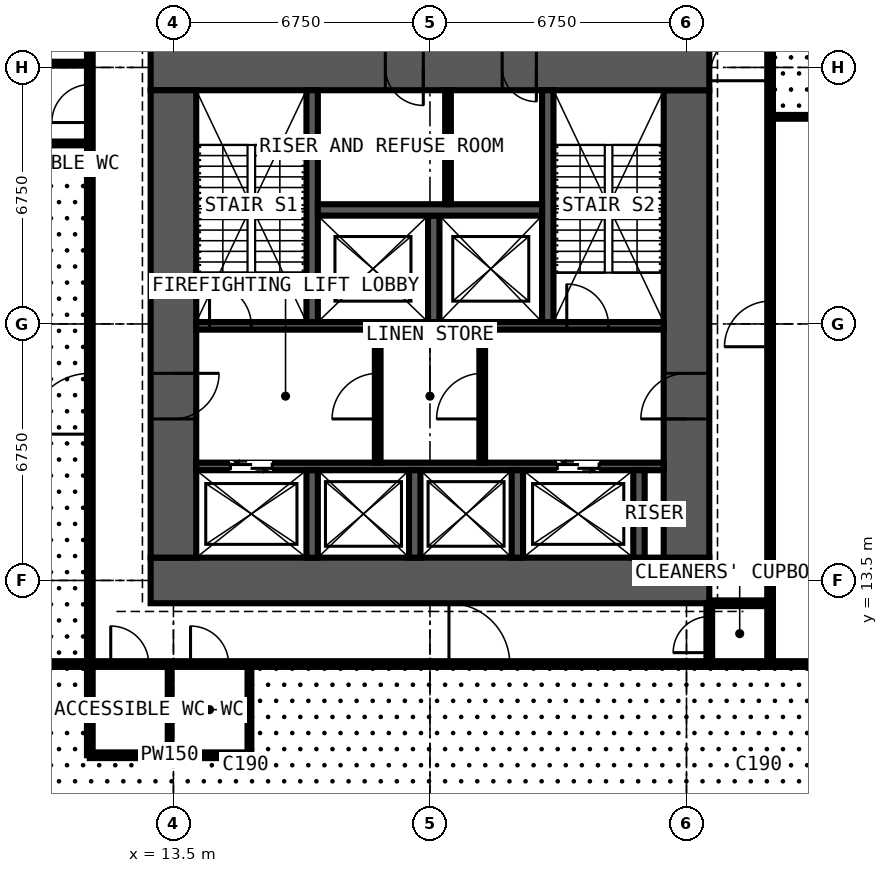
"""IFC4 building model, lengths in metres.
Left out: names, types, materials, properties, quantities, classifications, styles, units other than length and angle.
Written with IfcOpenShell. Run it as: python <this file> out.ifc"""

import sys

from ifc_helpers import new_model, si_unit, direction, frame, frame_2d, origin, place, context, subcontext, project, spatial, rectangle, extrude, element, fill, save


model = new_model("IFC4")
c1 = context("Model", 3, precision=1e-05, world=origin(), true_north=direction((0.0, 1.0)))
c2 = subcontext(c1, "Body", "Model", "MODEL_VIEW")
j1 = project(units=[si_unit("LENGTHUNIT", "METRE"), si_unit("PLANEANGLEUNIT", "RADIAN")], contexts=[c1])
p1 = place(None, origin())
s1 = spatial("IfcSite", under=j1, at=p1, CompositionType="ELEMENT")
p2 = place(p1, origin())
s2 = spatial("IfcBuilding", under=s1, at=p2, CompositionType="ELEMENT")
p3 = place(p2, frame((0.0, 0.0, 13.5)))
s3 = spatial("IfcBuildingStorey", under=s2, at=p3, CompositionType="ELEMENT", Elevation=13.5)
p4 = place(p3, frame((12.9, 13.5, 0.0), z_axis=(0.0, 0.0, 1.0), x_axis=(1.0, 0.0, 0.0)))
e1 = element("IfcWall", 1, at=p4, inside=s3, PredefinedType="SHEAR", context=c2, shape_type="SweptSolid", body=[
    extrude(rectangle(XDim=14.7, YDim=1.2, at=frame_2d((7.35, 0.0))), origin(), (0.0, 0.0, 1.0), 4.5),
])
p5 = place(p3, frame((27.0, 14.1, 0.0), z_axis=(0.0, 0.0, 1.0), x_axis=(0.0, 1.0, 0.0)))
e2 = element("IfcWall", 2, at=p5, inside=s3, PredefinedType="SHEAR", context=c2, shape_type="SweptSolid", body=[
    extrude(rectangle(XDim=12.3, YDim=1.2, at=frame_2d((6.15, 0.0))), origin(), (0.0, 0.0, 1.0), 4.5),
])
p6 = place(p5, frame((3.65, 0.0, 0.0)))
e3 = element("IfcOpeningElement", 3, at=p6, cuts=e2, PredefinedType="OPENING", context=c2, shape_type="SweptSolid", body=[
    extrude(rectangle(XDim=1.2, YDim=2.2, at=frame_2d((0.6, 1.1))), frame((0.0, 0.61, 0.0), z_axis=(0.0, -1.0, 0.0), x_axis=(1.0, 0.0, 0.0)), (0.0, 0.0, 1.0), 1.22),
])
p7 = place(p3, frame((27.6, 27.0, 0.0), z_axis=(0.0, 0.0, 1.0), x_axis=(-1.0, 0.0, 0.0)))
e4 = element("IfcWall", 4, at=p7, inside=s3, PredefinedType="SHEAR", context=c2, shape_type="SweptSolid", body=[
    extrude(rectangle(XDim=14.7, YDim=1.2, at=frame_2d((7.35, 0.0))), origin(), (0.0, 0.0, 1.0), 4.5),
])
p8 = place(p7, frame((4.55, 0.0, 0.0)))
e5 = element("IfcOpeningElement", 5, at=p8, cuts=e4, PredefinedType="OPENING", context=c2, shape_type="SweptSolid", body=[
    extrude(rectangle(XDim=0.9, YDim=2.2, at=frame_2d((0.45, 1.1))), frame((0.0, 0.61, 0.0), z_axis=(0.0, -1.0, 0.0), x_axis=(1.0, 0.0, 0.0)), (0.0, 0.0, 1.0), 1.22),
])
p9 = place(p7, frame((7.525, 0.0, 0.0)))
e6 = element("IfcOpeningElement", 6, at=p9, cuts=e4, PredefinedType="OPENING", context=c2, shape_type="SweptSolid", body=[
    extrude(rectangle(XDim=1.0, YDim=2.2, at=frame_2d((0.5, 1.1))), frame((0.0, 0.61, 0.0), z_axis=(0.0, -1.0, 0.0), x_axis=(1.0, 0.0, 0.0)), (0.0, 0.0, 1.0), 1.22),
])
p10 = place(p3, frame((13.5, 26.4, 0.0), z_axis=(0.0, 0.0, 1.0), x_axis=(0.0, -1.0, 0.0)))
e7 = element("IfcWall", 7, at=p10, inside=s3, PredefinedType="SHEAR", context=c2, shape_type="SweptSolid", body=[
    extrude(rectangle(XDim=12.3, YDim=1.2, at=frame_2d((6.15, 0.0))), origin(), (0.0, 0.0, 1.0), 4.5),
])
p11 = place(p10, frame((7.45, 0.0, 0.0)))
e8 = element("IfcOpeningElement", 8, at=p11, cuts=e7, PredefinedType="OPENING", context=c2, shape_type="SweptSolid", body=[
    extrude(rectangle(XDim=1.2, YDim=2.2, at=frame_2d((0.6, 1.1))), frame((0.0, 0.61, 0.0), z_axis=(0.0, -1.0, 0.0), x_axis=(1.0, 0.0, 0.0)), (0.0, 0.0, 1.0), 1.22),
])
p12 = place(p3, frame((14.1, 16.5, 0.0), z_axis=(0.0, 0.0, 1.0), x_axis=(1.0, 0.0, 0.0)))
e9 = element("IfcWall", 9, at=p12, inside=s3, PredefinedType="SHEAR", context=c2, shape_type="SweptSolid", body=[
    extrude(rectangle(XDim=12.3, YDim=0.2, at=frame_2d((6.15, 0.0))), origin(), (0.0, 0.0, 1.0), 4.5),
])
p13 = place(p12, frame((0.9, 0.0, 0.0)))
e10 = element("IfcOpeningElement", 10, at=p13, cuts=e9, PredefinedType="OPENING", context=c2, shape_type="SweptSolid", body=[
    extrude(rectangle(XDim=1.1, YDim=2.2, at=frame_2d((0.55, 1.1))), frame((0.0, 0.11, 0.0), z_axis=(0.0, -1.0, 0.0), x_axis=(1.0, 0.0, 0.0)), (0.0, 0.0, 1.0), 0.22),
])
p14 = place(p12, frame((9.5, 0.0, 0.0)))
e11 = element("IfcOpeningElement", 11, at=p14, cuts=e9, PredefinedType="OPENING", context=c2, shape_type="SweptSolid", body=[
    extrude(rectangle(XDim=1.1, YDim=2.2, at=frame_2d((0.55, 1.1))), frame((0.0, 0.11, 0.0), z_axis=(0.0, -1.0, 0.0), x_axis=(1.0, 0.0, 0.0)), (0.0, 0.0, 1.0), 0.22),
])
p15 = place(p3, frame((14.1, 20.2, 0.0), z_axis=(0.0, 0.0, 1.0), x_axis=(1.0, 0.0, 0.0)))
e12 = element("IfcWall", 12, at=p15, inside=s3, PredefinedType="SHEAR", context=c2, shape_type="SweptSolid", body=[
    extrude(rectangle(XDim=12.3, YDim=0.2, at=frame_2d((6.15, 0.0))), origin(), (0.0, 0.0, 1.0), 4.5),
])
p16 = place(p15, frame((0.35, 0.0, 0.0)))
e13 = element("IfcOpeningElement", 13, at=p16, cuts=e12, PredefinedType="OPENING", context=c2, shape_type="SweptSolid", body=[
    extrude(rectangle(XDim=1.1, YDim=2.2, at=frame_2d((0.55, 1.1))), frame((0.0, 0.11, 0.0), z_axis=(0.0, -1.0, 0.0), x_axis=(1.0, 0.0, 0.0)), (0.0, 0.0, 1.0), 0.22),
])
p17 = place(p15, frame((9.75, 0.0, 0.0)))
e14 = element("IfcOpeningElement", 14, at=p17, cuts=e12, PredefinedType="OPENING", context=c2, shape_type="SweptSolid", body=[
    extrude(rectangle(XDim=1.1, YDim=2.2, at=frame_2d((0.55, 1.1))), frame((0.0, 0.11, 0.0), z_axis=(0.0, -1.0, 0.0), x_axis=(1.0, 0.0, 0.0)), (0.0, 0.0, 1.0), 0.22),
])
for number, where, z_axis, x_axis in (
    (15, (17.15, 20.3, 0.0), (0.0, 0.0, 1.0), (0.0, 1.0, 0.0)),
    (16, (23.35, 20.3, 0.0), (0.0, 0.0, 1.0), (0.0, 1.0, 0.0)),
):
    element("IfcWall", number, at=place(p3, frame(where, z_axis=z_axis, x_axis=x_axis)), inside=s3, PredefinedType="SHEAR", context=c2, shape_type="SweptSolid", body=[
        extrude(rectangle(XDim=6.1, YDim=0.3, at=frame_2d((3.05, 0.0))), origin(), (0.0, 0.0, 1.0), 4.5),
    ])
p18 = place(p3, frame((20.35, 20.3, 0.0), z_axis=(0.0, 0.0, 1.0), x_axis=(0.0, 1.0, 0.0)))
e17 = element("IfcWall", 17, at=p18, inside=s3, PredefinedType="SHEAR", context=c2, shape_type="SweptSolid", body=[
    extrude(rectangle(XDim=2.8, YDim=0.3, at=frame_2d((1.4, 0.0))), origin(), (0.0, 0.0, 1.0), 4.5),
])
p19 = place(p3, frame((17.3, 23.25, 0.0), z_axis=(0.0, 0.0, 1.0), x_axis=(1.0, 0.0, 0.0)))
e18 = element("IfcWall", 18, at=p19, inside=s3, PredefinedType="SHEAR", context=c2, shape_type="SweptSolid", body=[
    extrude(rectangle(XDim=5.9, YDim=0.3, at=frame_2d((2.95, 0.0))), origin(), (0.0, 0.0, 1.0), 4.5),
])
for number, where, z_axis, x_axis in (
    (19, (17.15, 14.1, 0.0), (0.0, 0.0, 1.0), (0.0, 1.0, 0.0)),
    (20, (19.85, 14.1, 0.0), (0.0, 0.0, 1.0), (0.0, 1.0, 0.0)),
    (21, (22.55, 14.1, 0.0), (0.0, 0.0, 1.0), (0.0, 1.0, 0.0)),
    (22, (25.75, 14.1, 0.0), (0.0, 0.0, 1.0), (0.0, 1.0, 0.0)),
):
    element("IfcWall", number, at=place(p3, frame(where, z_axis=z_axis, x_axis=x_axis)), inside=s3, PredefinedType="SHEAR", context=c2, shape_type="SweptSolid", body=[
        extrude(rectangle(XDim=2.3, YDim=0.3, at=frame_2d((1.15, 0.0))), origin(), (0.0, 0.0, 1.0), 4.5),
    ])
p20 = place(p3, frame((18.875, 16.6, 0.0), z_axis=(0.0, 0.0, 1.0), x_axis=(0.0, 1.0, 0.0)))
e23 = element("IfcWall", 23, at=p20, inside=s3, PredefinedType="PARTITIONING", context=c2, shape_type="SweptSolid", body=[
    extrude(rectangle(XDim=3.5, YDim=0.15, at=frame_2d((1.75, 0.0))), origin(), (0.0, 0.0, 1.0), 4.275),
])
p21 = place(p20, frame((1.15, 0.0, 0.0)))
e24 = element("IfcOpeningElement", 24, at=p21, cuts=e23, PredefinedType="OPENING", context=c2, shape_type="SweptSolid", body=[
    extrude(rectangle(XDim=1.2, YDim=2.2, at=frame_2d((0.6, 1.1))), frame((0.0, 0.085, 0.0), z_axis=(0.0, -1.0, 0.0), x_axis=(1.0, 0.0, 0.0)), (0.0, 0.0, 1.0), 0.17),
])
p22 = place(p3, frame((21.625, 16.6, 0.0), z_axis=(0.0, 0.0, 1.0), x_axis=(0.0, 1.0, 0.0)))
e25 = element("IfcWall", 25, at=p22, inside=s3, PredefinedType="PARTITIONING", context=c2, shape_type="SweptSolid", body=[
    extrude(rectangle(XDim=3.5, YDim=0.15, at=frame_2d((1.75, 0.0))), origin(), (0.0, 0.0, 1.0), 4.275),
])
p23 = place(p22, frame((1.15, 0.0, 0.0)))
e26 = element("IfcOpeningElement", 26, at=p23, cuts=e25, PredefinedType="OPENING", context=c2, shape_type="SweptSolid", body=[
    extrude(rectangle(XDim=1.2, YDim=2.2, at=frame_2d((0.6, 1.1))), frame((0.0, 0.085, 0.0), z_axis=(0.0, -1.0, 0.0), x_axis=(1.0, 0.0, 0.0)), (0.0, 0.0, 1.0), 0.17),
])
p24 = place(p3, frame((20.725, 23.4, 0.0), z_axis=(0.0, 0.0, 1.0), x_axis=(0.0, 1.0, 0.0)))
e27 = element("IfcWall", 27, at=p24, inside=s3, PredefinedType="PARTITIONING", context=c2, shape_type="SweptSolid", body=[
    extrude(rectangle(XDim=3.0, YDim=0.15, at=frame_2d((1.5, 0.0))), origin(), (0.0, 0.0, 1.0), 4.275),
])
p25 = place(p3, frame((8.9, 25.0, 0.0), z_axis=(0.0, 0.0, 1.0), x_axis=(1.0, 0.0, 0.0)))
e28 = element("IfcWall", 28, at=p25, inside=s3, PredefinedType="PARTITIONING", context=c2, shape_type="SweptSolid", body=[
    extrude(rectangle(XDim=2.4, YDim=0.1, at=frame_2d((1.2, 0.0))), origin(), (0.0, 0.0, 1.0), 4.275),
])
p26 = place(p3, frame((8.9, 27.1, 0.0), z_axis=(0.0, 0.0, 1.0), x_axis=(1.0, 0.0, 0.0)))
e29 = element("IfcWall", 29, at=p26, inside=s3, PredefinedType="PARTITIONING", context=c2, shape_type="SweptSolid", body=[
    extrude(rectangle(XDim=2.4, YDim=0.1, at=frame_2d((1.2, 0.0))), origin(), (0.0, 0.0, 1.0), 3.777),
])
p27 = place(p3, frame((10.125, 11.3, 0.0), z_axis=(0.0, 0.0, 1.0), x_axis=(1.0, 0.0, 0.0)))
e30 = element("IfcWall", 30, at=p27, inside=s3, PredefinedType="PARTITIONING", context=c2, shape_type="SweptSolid", body=[
    extrude(rectangle(XDim=20.675, YDim=0.15, at=frame_2d((10.337, 0.0))), origin(), (0.0, 0.0, 1.0), 4.275),
])
p28 = place(p27, frame((1.725, 0.0, 0.0)))
e31 = element("IfcOpeningElement", 31, at=p28, cuts=e30, PredefinedType="OPENING", context=c2, shape_type="SweptSolid", body=[
    extrude(rectangle(XDim=1.0, YDim=2.2, at=frame_2d((0.5, 1.1))), frame((0.0, 0.085, 0.0), z_axis=(0.0, -1.0, 0.0), x_axis=(1.0, 0.0, 0.0)), (0.0, 0.0, 1.0), 0.17),
])
p29 = place(p27, frame((3.825, 0.0, 0.0)))
e32 = element("IfcOpeningElement", 32, at=p29, cuts=e30, PredefinedType="OPENING", context=c2, shape_type="SweptSolid", body=[
    extrude(rectangle(XDim=1.0, YDim=2.2, at=frame_2d((0.5, 1.1))), frame((0.0, 0.085, 0.0), z_axis=(0.0, -1.0, 0.0), x_axis=(1.0, 0.0, 0.0)), (0.0, 0.0, 1.0), 0.17),
])
p30 = place(p27, frame((10.625, 0.0, 0.0)))
e33 = element("IfcOpeningElement", 33, at=p30, cuts=e30, PredefinedType="OPENING", context=c2, shape_type="SweptSolid", body=[
    extrude(rectangle(XDim=1.6, YDim=2.4, at=frame_2d((0.8, 1.2))), frame((0.0, 0.085, 0.0), z_axis=(0.0, -1.0, 0.0), x_axis=(1.0, 0.0, 0.0)), (0.0, 0.0, 1.0), 0.17),
])
p31 = place(p3, frame((11.3, 8.9, 0.0), z_axis=(0.0, 0.0, 1.0), x_axis=(0.0, 1.0, 0.0)))
e34 = element("IfcWall", 34, at=p31, inside=s3, PredefinedType="PARTITIONING", context=c2, shape_type="SweptSolid", body=[
    extrude(rectangle(XDim=21.475, YDim=0.15, at=frame_2d((10.738, 0.0))), origin(), (0.0, 0.0, 1.0), 4.275),
])
p32 = place(p31, frame((16.65, 0.0, 0.0)))
e35 = element("IfcOpeningElement", 35, at=p32, cuts=e34, PredefinedType="OPENING", context=c2, shape_type="SweptSolid", body=[
    extrude(rectangle(XDim=1.0, YDim=2.2, at=frame_2d((0.5, 1.1))), frame((0.0, 0.085, 0.0), z_axis=(0.0, -1.0, 0.0), x_axis=(1.0, 0.0, 0.0)), (0.0, 0.0, 1.0), 0.17),
])
p33 = place(p31, frame((18.75, 0.0, 0.0)))
e36 = element("IfcOpeningElement", 36, at=p33, cuts=e34, PredefinedType="OPENING", context=c2, shape_type="SweptSolid", body=[
    extrude(rectangle(XDim=1.0, YDim=2.2, at=frame_2d((0.5, 1.1))), frame((0.0, 0.085, 0.0), z_axis=(0.0, -1.0, 0.0), x_axis=(1.0, 0.0, 0.0)), (0.0, 0.0, 1.0), 0.17),
])
p34 = place(p31, frame((8.45, 0.0, 0.0)))
e37 = element("IfcOpeningElement", 37, at=p34, cuts=e34, PredefinedType="OPENING", context=c2, shape_type="SweptSolid", body=[
    extrude(rectangle(XDim=1.6, YDim=2.4, at=frame_2d((0.8, 1.2))), frame((0.0, 0.085, 0.0), z_axis=(0.0, -1.0, 0.0), x_axis=(1.0, 0.0, 0.0)), (0.0, 0.0, 1.0), 0.17),
])
p35 = place(p3, frame((11.3, 8.9, 0.0), z_axis=(0.0, 0.0, 1.0), x_axis=(1.0, 0.0, 0.0)))
e38 = element("IfcWall", 38, at=p35, inside=s3, PredefinedType="PARTITIONING", context=c2, shape_type="SweptSolid", body=[
    extrude(rectangle(XDim=4.2, YDim=0.15, at=frame_2d((2.1, 0.0))), origin(), (0.0, 0.0, 1.0), 4.275),
])
p36 = place(p3, frame((13.4, 8.9, 0.0), z_axis=(0.0, 0.0, 1.0), x_axis=(0.0, 1.0, 0.0)))
e39 = element("IfcWall", 39, at=p36, inside=s3, PredefinedType="PARTITIONING", context=c2, shape_type="SweptSolid", body=[
    extrude(rectangle(XDim=2.4, YDim=0.1, at=frame_2d((1.2, 0.0))), origin(), (0.0, 0.0, 1.0), 3.777),
])
p37 = place(p3, frame((15.5, 8.9, 0.0), z_axis=(0.0, 0.0, 1.0), x_axis=(0.0, 1.0, 0.0)))
e40 = element("IfcWall", 40, at=p37, inside=s3, PredefinedType="PARTITIONING", context=c2, shape_type="SweptSolid", body=[
    extrude(rectangle(XDim=2.4, YDim=0.1, at=frame_2d((1.2, 0.0))), origin(), (0.0, 0.0, 1.0), 4.275),
])
p38 = place(p3, frame((27.6, 11.3, 0.0), z_axis=(0.0, 0.0, 1.0), x_axis=(0.0, 1.0, 0.0)))
e41 = element("IfcWall", 41, at=p38, inside=s3, PredefinedType="PARTITIONING", context=c2, shape_type="SweptSolid", body=[
    extrude(rectangle(XDim=1.6, YDim=0.15, at=frame_2d((0.8, 0.0))), origin(), (0.0, 0.0, 1.0), 4.275),
])
p39 = place(p38, frame((0.3, 0.0, 0.0)))
e42 = element("IfcOpeningElement", 42, at=p39, cuts=e41, PredefinedType="OPENING", context=c2, shape_type="SweptSolid", body=[
    extrude(rectangle(XDim=0.95, YDim=2.2, at=frame_2d((0.475, 1.1))), frame((0.0, 0.085, 0.0), z_axis=(0.0, -1.0, 0.0), x_axis=(1.0, 0.0, 0.0)), (0.0, 0.0, 1.0), 0.17),
])
p40 = place(p3, frame((27.6, 12.9, 0.0), z_axis=(0.0, 0.0, 1.0), x_axis=(1.0, 0.0, 0.0)))
e43 = element("IfcWall", 43, at=p40, inside=s3, PredefinedType="PARTITIONING", context=c2, shape_type="SweptSolid", body=[
    extrude(rectangle(XDim=1.6, YDim=0.15, at=frame_2d((0.8, 0.0))), origin(), (0.0, 0.0, 1.0), 3.777),
])
p41 = place(p3, frame((29.2, 11.3, 0.0), z_axis=(0.0, 0.0, 1.0), x_axis=(0.0, 1.0, 0.0)))
e44 = element("IfcWall", 44, at=p41, inside=s3, PredefinedType="PARTITIONING", context=c2, shape_type="SweptSolid", body=[
    extrude(rectangle(XDim=20.3, YDim=0.15, at=frame_2d((10.15, 0.0))), origin(), (0.0, 0.0, 1.0), 4.275),
])
p42 = place(p41, frame((15.35, 0.0, 0.0)))
e45 = element("IfcOpeningElement", 45, at=p42, cuts=e44, PredefinedType="OPENING", context=c2, shape_type="SweptSolid", body=[
    extrude(rectangle(XDim=1.6, YDim=2.4, at=frame_2d((0.8, 1.2))), frame((0.0, 0.085, 0.0), z_axis=(0.0, -1.0, 0.0), x_axis=(1.0, 0.0, 0.0)), (0.0, 0.0, 1.0), 0.17),
])
p43 = place(p41, frame((8.35, 0.0, 0.0)))
e46 = element("IfcOpeningElement", 46, at=p43, cuts=e44, PredefinedType="OPENING", context=c2, shape_type="SweptSolid", body=[
    extrude(rectangle(XDim=1.2, YDim=2.2, at=frame_2d((0.6, 1.1))), frame((0.0, 0.085, 0.0), z_axis=(0.0, -1.0, 0.0), x_axis=(1.0, 0.0, 0.0)), (0.0, 0.0, 1.0), 0.17),
])
p44 = place(p3, frame((29.2, 25.7, 0.0), z_axis=(0.0, 0.0, 1.0), x_axis=(1.0, 0.0, 0.0)))
e47 = element("IfcWall", 47, at=p44, inside=s3, PredefinedType="SHEAR", context=c2, shape_type="SweptSolid", body=[
    extrude(rectangle(XDim=3.45, YDim=0.1, at=frame_2d((1.725, 0.0))), origin(), (0.0, 0.0, 1.0), 4.275),
])
p45 = place(p13, origin())
e48 = element("IfcDoor", 48, at=p45, inside=s3, OperationType="DOUBLE_DOOR_SLIDING", PredefinedType="DOOR", context=c2, shape_type="SweptSolid", body=[
    extrude(rectangle(XDim=1.1, YDim=2.2, at=frame_2d((0.55, 1.1))), frame((0.0, 0.025, 0.0), z_axis=(0.0, -1.0, 0.0), x_axis=(1.0, 0.0, 0.0)), (0.0, 0.0, 1.0), 0.05),
])
fill(e10, e48)
p46 = place(p14, origin())
e49 = element("IfcDoor", 49, at=p46, inside=s3, OperationType="DOUBLE_DOOR_SLIDING", PredefinedType="DOOR", context=c2, shape_type="SweptSolid", body=[
    extrude(rectangle(XDim=1.1, YDim=2.2, at=frame_2d((0.55, 1.1))), frame((0.0, 0.025, 0.0), z_axis=(0.0, -1.0, 0.0), x_axis=(1.0, 0.0, 0.0)), (0.0, 0.0, 1.0), 0.05),
])
fill(e11, e49)
p47 = place(p11, origin())
e50 = element("IfcDoor", 50, at=p47, inside=s3, OperationType="DOUBLE_DOOR_SINGLE_SWING", PredefinedType="DOOR", context=c2, shape_type="SweptSolid", body=[
    extrude(rectangle(XDim=1.2, YDim=2.2, at=frame_2d((0.6, 1.1))), frame((0.0, 0.025, 0.0), z_axis=(0.0, -1.0, 0.0), x_axis=(1.0, 0.0, 0.0)), (0.0, 0.0, 1.0), 0.05),
])
fill(e8, e50)
p48 = place(p6, origin())
e51 = element("IfcDoor", 51, at=p48, inside=s3, OperationType="DOUBLE_DOOR_SINGLE_SWING", PredefinedType="DOOR", context=c2, shape_type="SweptSolid", body=[
    extrude(rectangle(XDim=1.2, YDim=2.2, at=frame_2d((0.6, 1.1))), frame((0.0, 0.025, 0.0), z_axis=(0.0, -1.0, 0.0), x_axis=(1.0, 0.0, 0.0)), (0.0, 0.0, 1.0), 0.05),
])
fill(e3, e51)
p49 = place(p21, origin())
e52 = element("IfcDoor", 52, at=p49, inside=s3, OperationType="DOUBLE_DOOR_SINGLE_SWING", PredefinedType="DOOR", context=c2, shape_type="SweptSolid", body=[
    extrude(rectangle(XDim=1.2, YDim=2.2, at=frame_2d((0.6, 1.1))), frame((0.0, 0.025, 0.0), z_axis=(0.0, -1.0, 0.0), x_axis=(1.0, 0.0, 0.0)), (0.0, 0.0, 1.0), 0.05),
])
fill(e24, e52)
p50 = place(p23, origin())
e53 = element("IfcDoor", 53, at=p50, inside=s3, OperationType="DOUBLE_DOOR_SINGLE_SWING", PredefinedType="DOOR", context=c2, shape_type="SweptSolid", body=[
    extrude(rectangle(XDim=1.2, YDim=2.2, at=frame_2d((0.6, 1.1))), frame((0.0, 0.025, 0.0), z_axis=(0.0, -1.0, 0.0), x_axis=(1.0, 0.0, 0.0)), (0.0, 0.0, 1.0), 0.05),
])
fill(e26, e53)
p51 = place(p8, origin())
e54 = element("IfcDoor", 54, at=p51, inside=s3, OperationType="SINGLE_SWING_LEFT", PredefinedType="DOOR", context=c2, shape_type="SweptSolid", body=[
    extrude(rectangle(XDim=0.9, YDim=2.2, at=frame_2d((0.45, 1.1))), frame((0.0, 0.4, 0.0), z_axis=(0.0, -1.0, 0.0), x_axis=(1.0, 0.0, 0.0)), (0.0, 0.0, 1.0), 0.8),
])
fill(e5, e54)
p52 = place(p9, origin())
e55 = element("IfcDoor", 55, at=p52, inside=s3, OperationType="SINGLE_SWING_LEFT", PredefinedType="DOOR", context=c2, shape_type="SweptSolid", body=[
    extrude(rectangle(XDim=1.0, YDim=2.2, at=frame_2d((0.5, 1.1))), frame((0.0, 0.025, 0.0), z_axis=(0.0, -1.0, 0.0), x_axis=(1.0, 0.0, 0.0)), (0.0, 0.0, 1.0), 0.05),
])
fill(e6, e55)
p53 = place(p16, origin())
e56 = element("IfcDoor", 56, at=p53, inside=s3, OperationType="SINGLE_SWING_LEFT", PredefinedType="DOOR", context=c2, shape_type="SweptSolid", body=[
    extrude(rectangle(XDim=1.1, YDim=2.2, at=frame_2d((0.55, 1.1))), frame((0.0, 0.025, 0.0), z_axis=(0.0, -1.0, 0.0), x_axis=(1.0, 0.0, 0.0)), (0.0, 0.0, 1.0), 0.05),
])
fill(e13, e56)
p54 = place(p17, origin())
e57 = element("IfcDoor", 57, at=p54, inside=s3, OperationType="SINGLE_SWING_LEFT", PredefinedType="DOOR", context=c2, shape_type="SweptSolid", body=[
    extrude(rectangle(XDim=1.1, YDim=2.2, at=frame_2d((0.55, 1.1))), frame((0.0, 0.025, 0.0), z_axis=(0.0, -1.0, 0.0), x_axis=(1.0, 0.0, 0.0)), (0.0, 0.0, 1.0), 0.05),
])
fill(e14, e57)
p55 = place(p39, origin())
e58 = element("IfcDoor", 58, at=p55, inside=s3, OperationType="SINGLE_SWING_LEFT", PredefinedType="DOOR", context=c2, shape_type="SweptSolid", body=[
    extrude(rectangle(XDim=0.95, YDim=2.2, at=frame_2d((0.475, 1.1))), frame((0.0, 0.025, 0.0), z_axis=(0.0, -1.0, 0.0), x_axis=(1.0, 0.0, 0.0)), (0.0, 0.0, 1.0), 0.05),
])
fill(e42, e58)
p56 = place(p28, origin())
e59 = element("IfcDoor", 59, at=p56, inside=s3, OperationType="SINGLE_SWING_LEFT", PredefinedType="DOOR", context=c2, shape_type="SweptSolid", body=[
    extrude(rectangle(XDim=1.0, YDim=2.2, at=frame_2d((0.5, 1.1))), frame((0.0, 0.025, 0.0), z_axis=(0.0, -1.0, 0.0), x_axis=(1.0, 0.0, 0.0)), (0.0, 0.0, 1.0), 0.05),
])
fill(e31, e59)
p57 = place(p29, origin())
e60 = element("IfcDoor", 60, at=p57, inside=s3, OperationType="SINGLE_SWING_LEFT", PredefinedType="DOOR", context=c2, shape_type="SweptSolid", body=[
    extrude(rectangle(XDim=1.0, YDim=2.2, at=frame_2d((0.5, 1.1))), frame((0.0, 0.025, 0.0), z_axis=(0.0, -1.0, 0.0), x_axis=(1.0, 0.0, 0.0)), (0.0, 0.0, 1.0), 0.05),
])
fill(e32, e60)
p58 = place(p30, origin())
e61 = element("IfcDoor", 61, at=p58, inside=s3, OperationType="DOUBLE_DOOR_SINGLE_SWING", PredefinedType="DOOR", context=c2, shape_type="SweptSolid", body=[
    extrude(rectangle(XDim=1.6, YDim=2.4, at=frame_2d((0.8, 1.2))), frame((0.0, 0.025, 0.0), z_axis=(0.0, -1.0, 0.0), x_axis=(1.0, 0.0, 0.0)), (0.0, 0.0, 1.0), 0.05),
])
fill(e33, e61)
p59 = place(p42, origin())
e62 = element("IfcDoor", 62, at=p59, inside=s3, OperationType="DOUBLE_DOOR_SINGLE_SWING", PredefinedType="DOOR", context=c2, shape_type="SweptSolid", body=[
    extrude(rectangle(XDim=1.6, YDim=2.4, at=frame_2d((0.8, 1.2))), frame((0.0, 0.025, 0.0), z_axis=(0.0, -1.0, 0.0), x_axis=(1.0, 0.0, 0.0)), (0.0, 0.0, 1.0), 0.05),
])
fill(e45, e62)
p60 = place(p32, origin())
e63 = element("IfcDoor", 63, at=p60, inside=s3, OperationType="SINGLE_SWING_LEFT", PredefinedType="DOOR", context=c2, shape_type="SweptSolid", body=[
    extrude(rectangle(XDim=1.0, YDim=2.2, at=frame_2d((0.5, 1.1))), frame((0.0, 0.025, 0.0), z_axis=(0.0, -1.0, 0.0), x_axis=(1.0, 0.0, 0.0)), (0.0, 0.0, 1.0), 0.05),
])
fill(e35, e63)
p61 = place(p34, origin())
e64 = element("IfcDoor", 64, at=p61, inside=s3, OperationType="DOUBLE_DOOR_SINGLE_SWING", PredefinedType="DOOR", context=c2, shape_type="SweptSolid", body=[
    extrude(rectangle(XDim=1.6, YDim=2.4, at=frame_2d((0.8, 1.2))), frame((0.0, 0.025, 0.0), z_axis=(0.0, -1.0, 0.0), x_axis=(1.0, 0.0, 0.0)), (0.0, 0.0, 1.0), 0.05),
])
fill(e37, e64)
p62 = place(p43, origin())
e65 = element("IfcDoor", 65, at=p62, inside=s3, OperationType="DOUBLE_DOOR_SINGLE_SWING", PredefinedType="DOOR", context=c2, shape_type="SweptSolid", body=[
    extrude(rectangle(XDim=1.2, YDim=2.2, at=frame_2d((0.6, 1.1))), frame((0.0, 0.025, 0.0), z_axis=(0.0, -1.0, 0.0), x_axis=(1.0, 0.0, 0.0)), (0.0, 0.0, 1.0), 0.05),
])
fill(e46, e65)
save(model, sys.argv[1])
